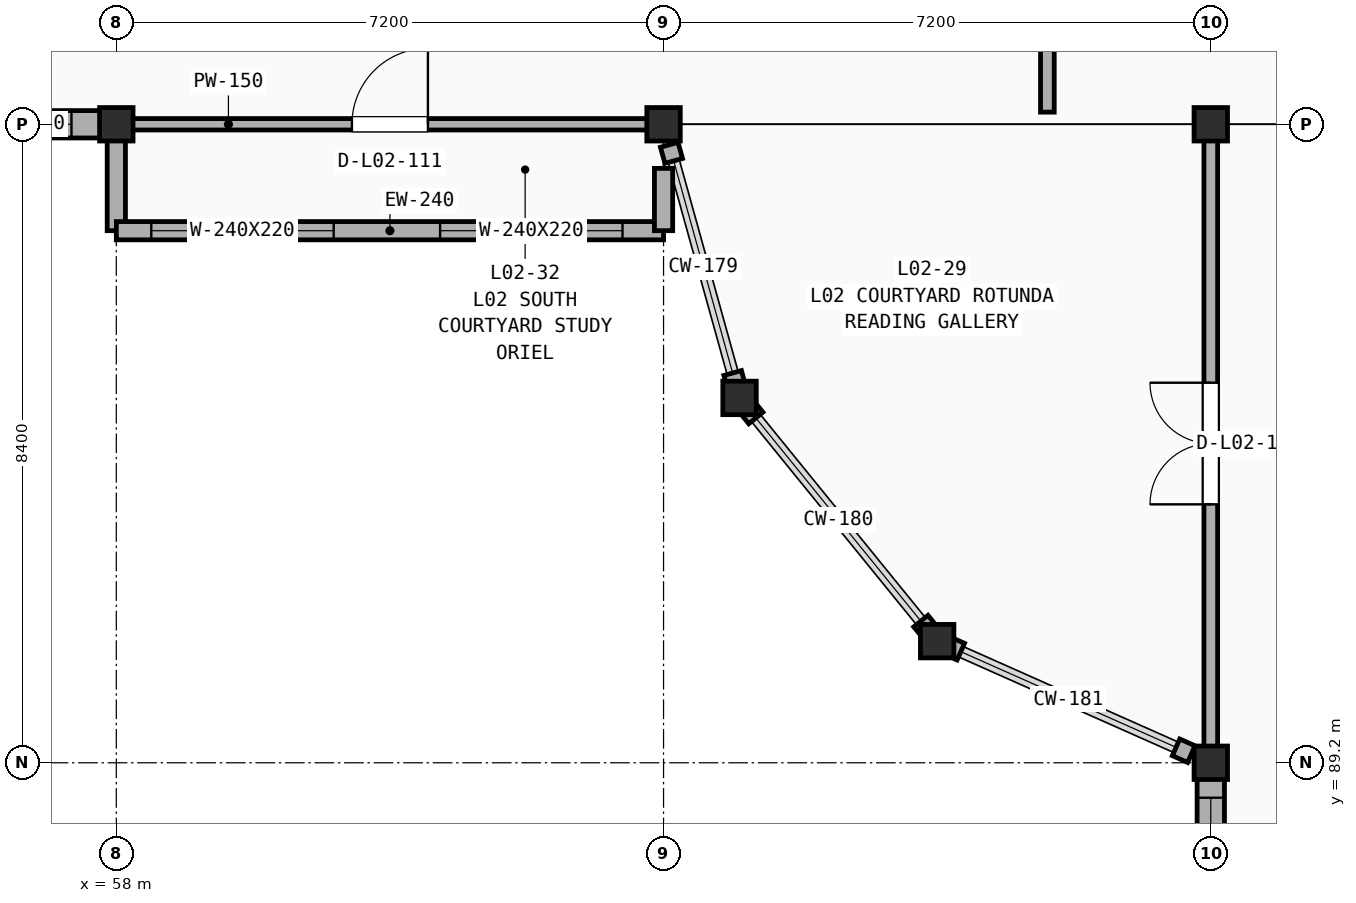
"""IFC4 building model, lengths in metres.
Left out: names, types, materials, properties, quantities, classifications, styles, units other than length and angle.
Written with IfcOpenShell. Run it as: python <this file> out.ifc"""

import sys

from ifc_helpers import new_model, si_unit, direction, frame, frame_2d, origin, origin_2d, place, context, subcontext, project, spatial, rectangle, extrude, element, fill, save


model = new_model("IFC4")
c1 = context("Model", 3, precision=1e-05, world=origin(), true_north=direction((0.0, 1.0)))
c2 = subcontext(c1, "Body", "Model", "MODEL_VIEW")
j1 = project(units=[si_unit("LENGTHUNIT", "METRE"), si_unit("PLANEANGLEUNIT", "RADIAN")], contexts=[c1])
p1 = place(None, origin())
s1 = spatial("IfcSite", under=j1, at=p1, CompositionType="ELEMENT")
p2 = place(p1, origin())
s2 = spatial("IfcBuilding", under=s1, at=p2, CompositionType="ELEMENT")
p3 = place(p2, frame((0.0, 0.0, 9.6)))
s3 = spatial("IfcBuildingStorey", under=s2, at=p3, CompositionType="ELEMENT", Elevation=9.6)
for number, where, z_axis, x_axis in (
    (1, (58.0, 97.6, 0.0), (0.0, 0.0, 1.0), (1.0, 0.0, 0.0)),
    (2, (65.2, 97.6, 0.0), (0.0, 0.0, 1.0), (1.0, 0.0, 0.0)),
    (3, (66.2, 94.0, 0.0), (0.0, 0.0, 1.0), (1.0, 0.0, 0.0)),
    (4, (68.8, 90.8, 0.0), (0.0, 0.0, 1.0), (1.0, 0.0, 0.0)),
    (5, (72.4, 89.2, 0.0), (0.0, 0.0, 1.0), (1.0, 0.0, 0.0)),
    (6, (72.4, 97.6, 0.0), (0.0, 0.0, 1.0), (1.0, 0.0, 0.0)),
):
    element("IfcColumn", number, at=place(p3, frame(where, z_axis=z_axis, x_axis=x_axis)), inside=s3, PredefinedType="COLUMN", context=c2, shape_type="SweptSolid", body=[
        extrude(rectangle(XDim=0.44, YDim=0.44, at=origin_2d()), origin(), (0.0, 0.0, 1.0), 4.2),
    ])
p4 = place(p3, frame((58.0, 97.6, 0.0), z_axis=(0.0, 0.0, 1.0), x_axis=(1.0, 0.0, 0.0)))
e7 = element("IfcWall", 7, at=p4, inside=s3, PredefinedType="PARTITIONING", context=c2, shape_type="SweptSolid", body=[
    extrude(rectangle(XDim=7.2, YDim=0.15, at=frame_2d((3.6, 0.0))), origin(), (0.0, 0.0, 1.0), 3.45),
])
p5 = place(p4, frame((3.1, 0.0, -0.01)))
e8 = element("IfcOpeningElement", 8, at=p5, cuts=e7, PredefinedType="OPENING", context=c2, shape_type="SweptSolid", body=[
    extrude(rectangle(XDim=1.0, YDim=2.16, at=frame_2d((0.5, 1.08))), frame((0.0, 0.085, 0.0), z_axis=(0.0, -1.0, 0.0), x_axis=(1.0, 0.0, 0.0)), (0.0, 0.0, 1.0), 0.17),
])
p6 = place(p3, frame((70.25, 97.76, 0.0), z_axis=(0.0, 0.0, 1.0), x_axis=(0.0, 1.0, 0.0)))
e9 = element("IfcWall", 9, at=p6, inside=s3, PredefinedType="PARTITIONING", context=c2, shape_type="SweptSolid", body=[
    extrude(rectangle(XDim=4.19, YDim=0.18, at=frame_2d((2.095, 0.0))), origin(), (0.0, 0.0, 1.0), 3.61),
])
p7 = place(p3, frame((72.4, 89.2, 0.0), z_axis=(0.0, 0.0, 1.0), x_axis=(0.0, 1.0, 0.0)))
e10 = element("IfcWall", 10, at=p7, inside=s3, PredefinedType="PARTITIONING", context=c2, shape_type="SweptSolid", body=[
    extrude(rectangle(XDim=8.4, YDim=0.18, at=frame_2d((4.2, 0.0))), origin(), (0.0, 0.0, 1.0), 3.27),
])
p8 = place(p7, frame((3.4, 0.0, -0.01)))
e11 = element("IfcOpeningElement", 11, at=p8, cuts=e10, PredefinedType="OPENING", context=c2, shape_type="SweptSolid", body=[
    extrude(rectangle(XDim=1.6, YDim=2.21, at=frame_2d((0.8, 1.105))), frame((0.0, 0.1, 0.0), z_axis=(0.0, -1.0, 0.0), x_axis=(1.0, 0.0, 0.0)), (0.0, 0.0, 1.0), 0.2),
])
p9 = place(p3, frame((50.8, 97.6, 0.0), z_axis=(0.0, 0.0, 1.0), x_axis=(1.0, 0.0, 0.0)))
e12 = element("IfcWall", 12, at=p9, inside=s3, PredefinedType="SOLIDWALL", context=c2, shape_type="SweptSolid", body=[
    extrude(rectangle(XDim=7.2, YDim=0.36, at=frame_2d((3.6, 0.0))), origin(), (0.0, 0.0, 1.0), 3.45),
])
p10 = place(p9, frame((0.46, 0.0, 0.75)))
e13 = element("IfcOpeningElement", 13, at=p10, cuts=e12, PredefinedType="OPENING", context=c2, shape_type="SweptSolid", body=[
    extrude(rectangle(XDim=1.55, YDim=2.4, at=frame_2d((0.775, 1.2))), frame((0.0, 0.19, 0.0), z_axis=(0.0, -1.0, 0.0), x_axis=(1.0, 0.0, 0.0)), (0.0, 0.0, 1.0), 0.38),
])
p11 = place(p9, frame((5.06, 0.0, 0.75)))
e14 = element("IfcOpeningElement", 14, at=p11, cuts=e12, PredefinedType="OPENING", context=c2, shape_type="SweptSolid", body=[
    extrude(rectangle(XDim=1.55, YDim=2.4, at=frame_2d((0.775, 1.2))), frame((0.0, 0.19, 0.0), z_axis=(0.0, -1.0, 0.0), x_axis=(1.0, 0.0, 0.0)), (0.0, 0.0, 1.0), 0.38),
])
p12 = place(p3, frame((72.4, 89.2, 0.0), z_axis=(0.0, 0.0, 1.0), x_axis=(0.0, -1.0, 0.0)))
e15 = element("IfcWall", 15, at=p12, inside=s3, PredefinedType="SOLIDWALL", context=c2, shape_type="SweptSolid", body=[
    extrude(rectangle(XDim=8.4, YDim=0.36, at=frame_2d((4.2, 0.0))), origin(), (0.0, 0.0, 1.0), 3.27),
])
p13 = place(p12, frame((0.46, 0.0, 0.75)))
e16 = element("IfcOpeningElement", 16, at=p13, cuts=e15, PredefinedType="OPENING", context=c2, shape_type="SweptSolid", body=[
    extrude(rectangle(XDim=1.55, YDim=2.38, at=frame_2d((0.775, 1.19))), frame((0.0, 0.19, 0.0), z_axis=(0.0, -1.0, 0.0), x_axis=(1.0, 0.0, 0.0)), (0.0, 0.0, 1.0), 0.38),
])
p14 = place(p12, frame((6.26, 0.0, 0.75)))
e17 = element("IfcOpeningElement", 17, at=p14, cuts=e15, PredefinedType="OPENING", context=c2, shape_type="SweptSolid", body=[
    extrude(rectangle(XDim=1.55, YDim=2.38, at=frame_2d((0.775, 1.19))), frame((0.0, 0.19, 0.0), z_axis=(0.0, -1.0, 0.0), x_axis=(1.0, 0.0, 0.0)), (0.0, 0.0, 1.0), 0.38),
])
p15 = place(p3, frame((65.275, 97.33, 0.0), z_axis=(0.0, 0.0, 1.0), x_axis=(0.267529355044, -0.963549710285, 0.0)))
e18 = element("IfcWall", 18, at=p15, inside=s3, PredefinedType="SOLIDWALL", context=c2, shape_type="SweptSolid", body=[
    extrude(rectangle(XDim=0.22, YDim=0.24, at=frame_2d((0.11, 0.0))), origin(), (0.0, 0.0, 1.0), 3.61),
])
for number, where, z_axis, x_axis in (
    (19, (66.109, 94.328, 0.0), (0.0, 0.0, 1.0), (0.268, -0.963, 0.0)),
    (20, (66.2, 94.0, 0.0), (0.0, 0.0, 1.0), (0.63, -0.776, 0.0)),
    (21, (68.586, 91.064, 0.0), (0.0, 0.0, 1.0), (0.63, -0.776, 0.0)),
):
    element("IfcWall", number, at=place(p3, frame(where, z_axis=z_axis, x_axis=x_axis)), inside=s3, PredefinedType="SOLIDWALL", context=c2, shape_type="SweptSolid", body=[
        extrude(rectangle(XDim=0.34, YDim=0.24, at=frame_2d((0.17, 0.0))), origin(), (0.0, 0.0, 1.0), 3.61),
    ])
p16 = place(p3, frame((68.8, 90.8, 0.0), z_axis=(0.0, 0.0, 1.0), x_axis=(0.913633745955, -0.406538286329, 0.0)))
e22 = element("IfcWall", 22, at=p16, inside=s3, PredefinedType="SOLIDWALL", context=c2, shape_type="SweptSolid", body=[
    extrude(rectangle(XDim=0.34, YDim=0.24, at=frame_2d((0.17, 0.0))), origin(), (0.0, 0.0, 1.0), 3.61),
])
p17 = place(p3, frame((71.943, 89.403, 0.0), z_axis=(0.0, 0.0, 1.0), x_axis=(0.913719959968, -0.406344477944, 0.0)))
e23 = element("IfcWall", 23, at=p17, inside=s3, PredefinedType="SOLIDWALL", context=c2, shape_type="SweptSolid", body=[
    extrude(rectangle(XDim=0.22, YDim=0.24, at=frame_2d((0.11, 0.0))), origin(), (0.0, 0.0, 1.0), 3.61),
])
p18 = place(p3, frame((58.0, 97.45, 0.0), z_axis=(0.0, 0.0, 1.0), x_axis=(0.0, -1.0, 0.0)))
e24 = element("IfcWall", 24, at=p18, inside=s3, PredefinedType="SOLIDWALL", context=c2, shape_type="SweptSolid", body=[
    extrude(rectangle(XDim=1.25, YDim=0.24, at=frame_2d((0.625, 0.0))), origin(), (0.0, 0.0, 1.0), 3.45),
])
p19 = place(p3, frame((58.0, 96.2, 0.0), z_axis=(0.0, 0.0, 1.0), x_axis=(1.0, 0.0, 0.0)))
e25 = element("IfcWall", 25, at=p19, inside=s3, PredefinedType="SOLIDWALL", context=c2, shape_type="SweptSolid", body=[
    extrude(rectangle(XDim=7.2, YDim=0.24, at=frame_2d((3.6, 0.0))), origin(), (0.0, 0.0, 1.0), 3.45),
])
p20 = place(p19, frame((0.46, 0.0, 0.65)))
e26 = element("IfcOpeningElement", 26, at=p20, cuts=e25, PredefinedType="OPENING", context=c2, shape_type="SweptSolid", body=[
    extrude(rectangle(XDim=2.4, YDim=2.2, at=frame_2d((1.2, 1.1))), frame((0.0, 0.13, 0.0), z_axis=(0.0, -1.0, 0.0), x_axis=(1.0, 0.0, 0.0)), (0.0, 0.0, 1.0), 0.26),
])
p21 = place(p19, frame((4.26, 0.0, 0.65)))
e27 = element("IfcOpeningElement", 27, at=p21, cuts=e25, PredefinedType="OPENING", context=c2, shape_type="SweptSolid", body=[
    extrude(rectangle(XDim=2.4, YDim=2.2, at=frame_2d((1.2, 1.1))), frame((0.0, 0.13, 0.0), z_axis=(0.0, -1.0, 0.0), x_axis=(1.0, 0.0, 0.0)), (0.0, 0.0, 1.0), 0.26),
])
p22 = place(p3, frame((65.2, 96.2, 0.0), z_axis=(0.0, 0.0, 1.0), x_axis=(0.0, 1.0, 0.0)))
e28 = element("IfcWall", 28, at=p22, inside=s3, PredefinedType="SOLIDWALL", context=c2, shape_type="SweptSolid", body=[
    extrude(rectangle(XDim=0.82, YDim=0.24, at=frame_2d((0.41, 0.0))), origin(), (0.0, 0.0, 1.0), 3.45),
])
p23 = place(p5, frame((1.0, 0.0, 0.01), z_axis=(0.0, 0.0, 1.0), x_axis=(-1.0, 0.0, 0.0)))
e29 = element("IfcDoor", 29, at=p23, inside=s3, OperationType="SINGLE_SWING_RIGHT", PredefinedType="DOOR", context=c2, shape_type="SweptSolid", body=[
    extrude(rectangle(XDim=1.0, YDim=2.15, at=frame_2d((0.5, 1.075))), frame((0.0, 0.025, 0.0), z_axis=(0.0, -1.0, 0.0), x_axis=(1.0, 0.0, 0.0)), (0.0, 0.0, 1.0), 0.05),
])
fill(e8, e29)
p24 = place(p8, frame((0.0, 0.0, 0.01)))
e30 = element("IfcDoor", 30, at=p24, inside=s3, OperationType="DOUBLE_SWING_LEFT", PredefinedType="DOOR", context=c2, shape_type="SweptSolid", body=[
    extrude(rectangle(XDim=1.6, YDim=2.2, at=frame_2d((0.8, 1.1))), frame((0.0, 0.025, 0.0), z_axis=(0.0, -1.0, 0.0), x_axis=(1.0, 0.0, 0.0)), (0.0, 0.0, 1.0), 0.05),
])
fill(e11, e30)
p25 = place(p11, origin())
e31 = element("IfcWindow", 31, at=p25, inside=s3, PartitioningType="DOUBLE_PANEL_HORIZONTAL", PredefinedType="WINDOW", context=c2, shape_type="SweptSolid", body=[
    extrude(rectangle(XDim=1.55, YDim=2.4, at=frame_2d((0.775, 1.2))), frame((0.0, 0.03, 0.0), z_axis=(0.0, -1.0, 0.0), x_axis=(1.0, 0.0, 0.0)), (0.0, 0.0, 1.0), 0.06),
])
fill(e14, e31)
p26 = place(p13, origin())
e32 = element("IfcWindow", 32, at=p26, inside=s3, PartitioningType="DOUBLE_PANEL_HORIZONTAL", PredefinedType="WINDOW", context=c2, shape_type="SweptSolid", body=[
    extrude(rectangle(XDim=1.55, YDim=2.38, at=frame_2d((0.775, 1.19))), frame((0.0, 0.03, 0.0), z_axis=(0.0, -1.0, 0.0), x_axis=(1.0, 0.0, 0.0)), (0.0, 0.0, 1.0), 0.06),
])
fill(e16, e32)
p27 = place(p20, origin())
e33 = element("IfcWindow", 33, at=p27, inside=s3, PartitioningType="TRIPLE_PANEL_VERTICAL", PredefinedType="WINDOW", context=c2, shape_type="SweptSolid", body=[
    extrude(rectangle(XDim=2.4, YDim=2.2, at=frame_2d((1.2, 1.1))), frame((0.0, 0.03, 0.0), z_axis=(0.0, -1.0, 0.0), x_axis=(1.0, 0.0, 0.0)), (0.0, 0.0, 1.0), 0.06),
])
fill(e26, e33)
p28 = place(p21, origin())
e34 = element("IfcWindow", 34, at=p28, inside=s3, PartitioningType="TRIPLE_PANEL_VERTICAL", PredefinedType="WINDOW", context=c2, shape_type="SweptSolid", body=[
    extrude(rectangle(XDim=2.4, YDim=2.2, at=frame_2d((1.2, 1.1))), frame((0.0, 0.03, 0.0), z_axis=(0.0, -1.0, 0.0), x_axis=(1.0, 0.0, 0.0)), (0.0, 0.0, 1.0), 0.06),
])
fill(e27, e34)
save(model, sys.argv[1])
